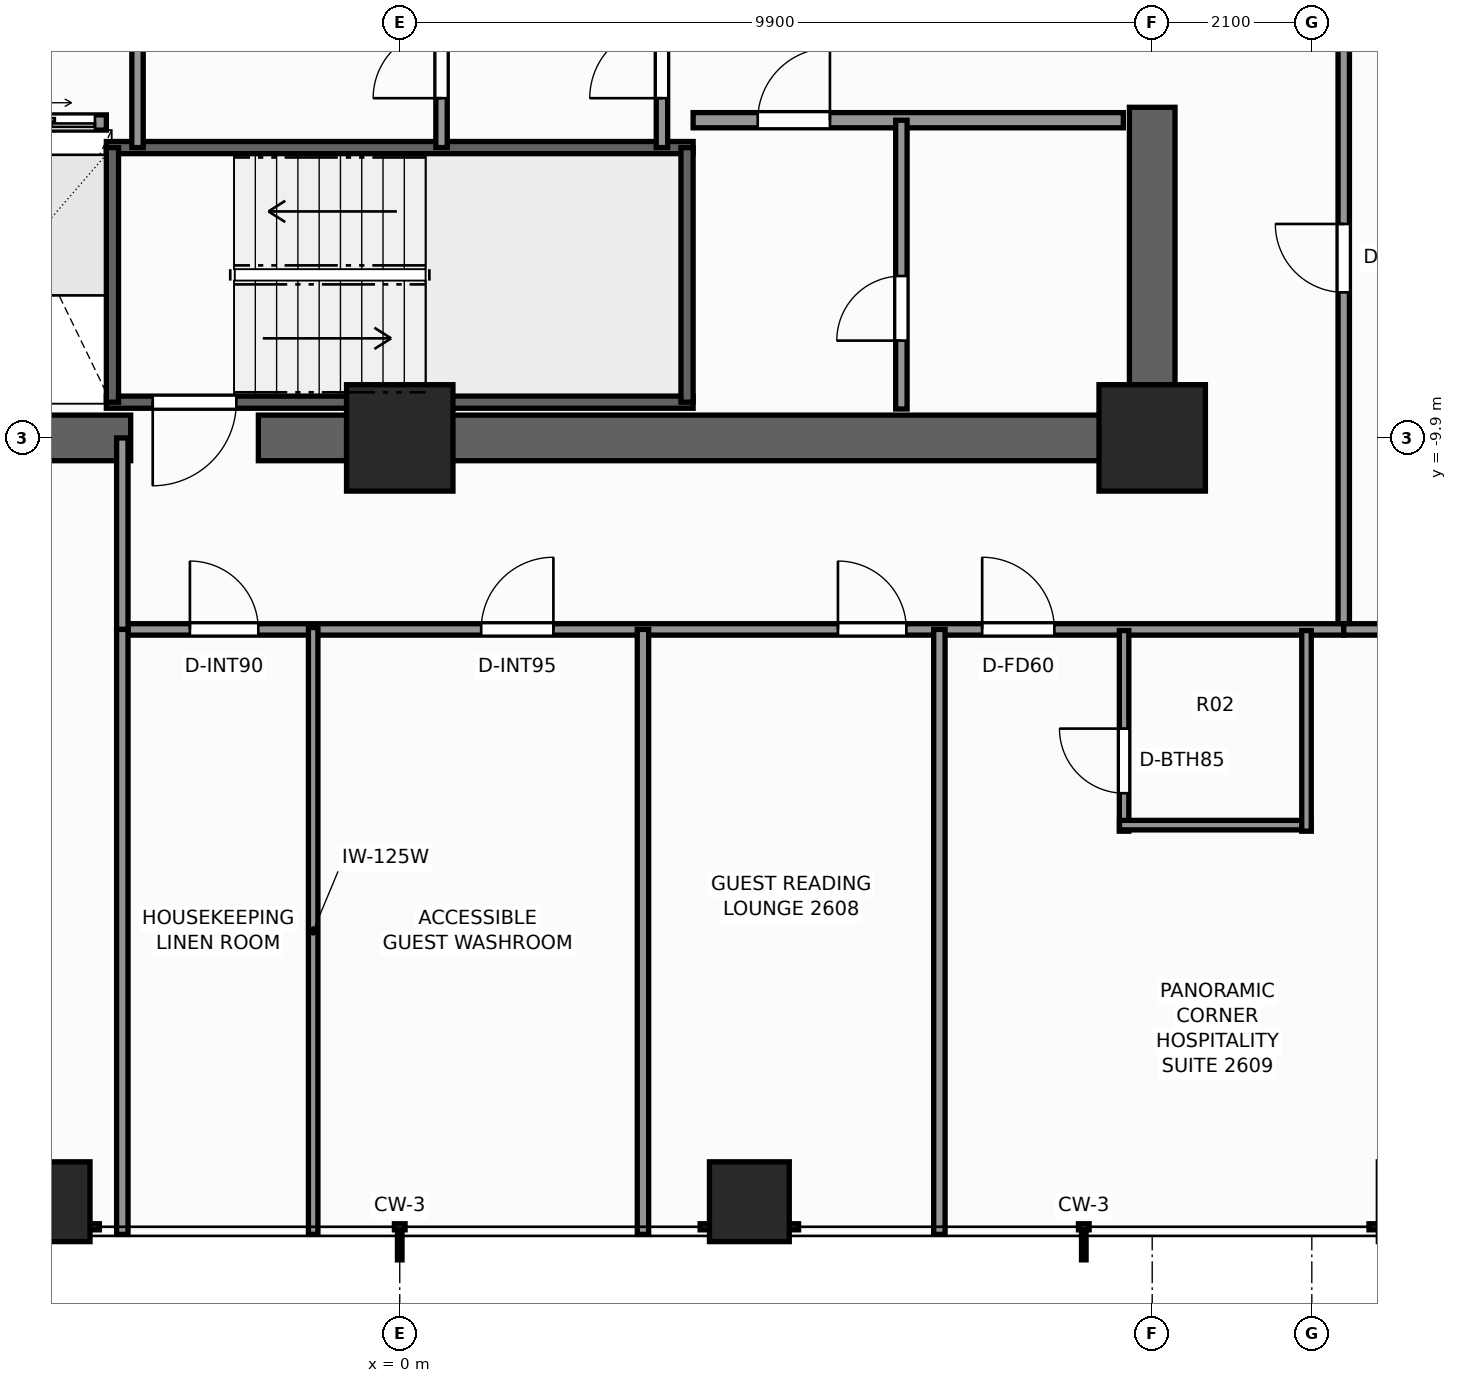
"""IFC4 building model, lengths in metres.
Left out: names, types, materials, properties, quantities, classifications, styles, units other than length and angle.
Written with IfcOpenShell. Run it as: python <this file> out.ifc"""

import sys

from ifc_helpers import new_model, si_unit, direction, frame, frame_2d, origin, origin_2d, place, context, subcontext, project, spatial, rectangle, extrude, element, fill, save


model = new_model("IFC4")
c1 = context("Model", 3, precision=1e-05, world=origin(), true_north=direction((0.0, 1.0)))
c2 = subcontext(c1, "Body", "Model", "MODEL_VIEW")
j1 = project(units=[si_unit("LENGTHUNIT", "METRE"), si_unit("PLANEANGLEUNIT", "RADIAN")], contexts=[c1])
p1 = place(None, origin())
s1 = spatial("IfcSite", under=j1, at=p1, CompositionType="ELEMENT")
p2 = place(p1, origin())
s2 = spatial("IfcBuilding", under=s1, at=p2, CompositionType="ELEMENT")
p3 = place(p2, frame((0.0, 0.0, 92.0)))
s3 = spatial("IfcBuildingStorey", under=s2, at=p3, CompositionType="ELEMENT", Elevation=92.0)
p4 = place(p3, frame((10.2, -9.9, 0.0), z_axis=(0.0, 0.0, 1.0), x_axis=(-1.0, 0.0, 0.0)))
e1 = element("IfcWall", 1, at=p4, inside=s3, PredefinedType="SHEAR", context=c2, shape_type="SweptSolid", body=[
    extrude(rectangle(XDim=12.06, YDim=0.6, at=frame_2d((6.03, 0.0))), origin(), (0.0, 0.0, 1.0), 3.3),
])
p5 = place(p3, frame((-3.54, -9.9, 0.0), z_axis=(0.0, 0.0, 1.0), x_axis=(-1.0, 0.0, 0.0)))
e2 = element("IfcWall", 2, at=p5, inside=s3, PredefinedType="SHEAR", context=c2, shape_type="SweptSolid", body=[
    extrude(rectangle(XDim=6.66, YDim=0.6, at=frame_2d((3.33, 0.0))), origin(), (0.0, 0.0, 1.0), 3.3),
])
p6 = place(p3, frame((9.9, -9.6, 0.0), z_axis=(0.0, 0.0, 1.0), x_axis=(0.0, 1.0, 0.0)))
e3 = element("IfcWall", 3, at=p6, inside=s3, PredefinedType="SHEAR", context=c2, shape_type="SweptSolid", body=[
    extrude(rectangle(XDim=4.05, YDim=0.6, at=frame_2d((2.025, 0.0))), origin(), (0.0, 0.0, 1.0), 3.3),
])
for number, where, z_axis, x_axis in (
    (4, (9.9, -9.9, 0.0), (0.0, 0.0, 1.0), (1.0, 0.0, 0.0)),
    (5, (0.0, -9.9, 0.0), (0.0, 0.0, 1.0), (1.0, 0.0, 0.0)),
):
    element("IfcColumn", number, at=place(p3, frame(where, z_axis=z_axis, x_axis=x_axis)), inside=s3, PredefinedType="COLUMN", context=c2, shape_type="SweptSolid", body=[
        extrude(rectangle(XDim=1.4, YDim=1.4, at=origin_2d()), origin(), (0.0, 0.0, 1.0), 3.3),
    ])
for number, where, z_axis, x_axis in (
    (6, (-4.6, -19.95, 0.0), (0.0, 0.0, 1.0), (1.0, 0.0, 0.0)),
    (7, (4.6, -19.95, 0.0), (0.0, 0.0, 1.0), (1.0, 0.0, 0.0)),
):
    element("IfcColumn", number, at=place(p3, frame(where, z_axis=z_axis, x_axis=x_axis)), inside=s3, PredefinedType="COLUMN", context=c2, shape_type="SweptSolid", body=[
        extrude(rectangle(XDim=1.05, YDim=1.05, at=origin_2d()), origin(), (0.0, 0.0, 1.0), 3.3),
    ])
p7 = place(p3, frame((3.86, -9.43, 0.0), z_axis=(0.0, 0.0, 1.0), x_axis=(-1.0, 0.0, 0.0)))
e8 = element("IfcWall", 8, at=p7, inside=s3, PredefinedType="SHEAR", context=c2, shape_type="SweptSolid", body=[
    extrude(rectangle(XDim=7.72, YDim=0.16, at=frame_2d((3.86, 0.0))), origin(), (0.0, 0.0, 1.0), 3.3),
])
p8 = place(p7, frame((6.01, 0.0, 0.0)))
e9 = element("IfcOpeningElement", 9, at=p8, cuts=e8, PredefinedType="OPENING", context=c2, shape_type="SweptSolid", body=[
    extrude(rectangle(XDim=1.1, YDim=2.2, at=frame_2d((0.55, 1.1))), frame((0.0, 0.09, 0.0), z_axis=(0.0, -1.0, 0.0), x_axis=(1.0, 0.0, 0.0)), (0.0, 0.0, 1.0), 0.18),
])
p9 = place(p3, frame((-3.86, -6.08, 0.0), z_axis=(0.0, 0.0, 1.0), x_axis=(1.0, 0.0, 0.0)))
e10 = element("IfcWall", 10, at=p9, inside=s3, PredefinedType="SHEAR", context=c2, shape_type="SweptSolid", body=[
    extrude(rectangle(XDim=7.72, YDim=0.16, at=frame_2d((3.86, 0.0))), origin(), (0.0, 0.0, 1.0), 3.3),
])
for number, where, z_axis, x_axis in (
    (11, (-3.78, -9.43, 0.0), (0.0, 0.0, 1.0), (0.0, 1.0, 0.0)),
    (12, (3.78, -9.43, 0.0), (0.0, 0.0, 1.0), (0.0, 1.0, 0.0)),
):
    element("IfcWall", number, at=place(p3, frame(where, z_axis=z_axis, x_axis=x_axis)), inside=s3, PredefinedType="SHEAR", context=c2, shape_type="SweptSolid", body=[
        extrude(rectangle(XDim=3.35, YDim=0.16, at=frame_2d((1.675, 0.0))), origin(), (0.0, 0.0, 1.0), 3.3),
    ])
p10 = place(p3, frame((-9.52, -5.75, 0.0), z_axis=(0.0, 0.0, 1.0), x_axis=(1.0, 0.0, 0.0)))
e13 = element("IfcWall", 13, at=p10, inside=s3, PredefinedType="SOLIDWALL", context=c2, shape_type="SweptSolid", body=[
    extrude(rectangle(XDim=5.66, YDim=0.2, at=frame_2d((2.83, 0.0))), origin(), (0.0, 0.0, 1.0), 3.08),
])
p11 = place(p10, frame((0.55, 0.0, 0.0)))
e14 = element("IfcOpeningElement", 14, at=p11, cuts=e13, PredefinedType="OPENING", context=c2, shape_type="SweptSolid", body=[
    extrude(rectangle(XDim=1.1, YDim=2.2, at=frame_2d((0.55, 1.1))), frame((0.0, 0.11, 0.0), z_axis=(0.0, -1.0, 0.0), x_axis=(1.0, 0.0, 0.0)), (0.0, 0.0, 1.0), 0.22),
])
p12 = place(p10, frame((2.48, 0.0, 0.0)))
e15 = element("IfcOpeningElement", 15, at=p12, cuts=e13, PredefinedType="OPENING", context=c2, shape_type="SweptSolid", body=[
    extrude(rectangle(XDim=1.1, YDim=2.2, at=frame_2d((0.55, 1.1))), frame((0.0, 0.11, 0.0), z_axis=(0.0, -1.0, 0.0), x_axis=(1.0, 0.0, 0.0)), (0.0, 0.0, 1.0), 0.22),
])
p13 = place(p10, frame((4.41, 0.0, 0.0)))
e16 = element("IfcOpeningElement", 16, at=p13, cuts=e13, PredefinedType="OPENING", context=c2, shape_type="SweptSolid", body=[
    extrude(rectangle(XDim=1.1, YDim=2.2, at=frame_2d((0.55, 1.1))), frame((0.0, 0.11, 0.0), z_axis=(0.0, -1.0, 0.0), x_axis=(1.0, 0.0, 0.0)), (0.0, 0.0, 1.0), 0.22),
])
p14 = place(p3, frame((3.86, -5.72, 0.0), z_axis=(0.0, 0.0, 1.0), x_axis=(1.0, 0.0, 0.0)))
e17 = element("IfcWall", 17, at=p14, inside=s3, PredefinedType="SOLIDWALL", context=c2, shape_type="SweptSolid", body=[
    extrude(rectangle(XDim=5.66, YDim=0.2, at=frame_2d((2.83, 0.0))), origin(), (0.0, 0.0, 1.0), 3.08),
])
p15 = place(p14, frame((0.85, 0.0, 0.0)))
e18 = element("IfcOpeningElement", 18, at=p15, cuts=e17, PredefinedType="OPENING", context=c2, shape_type="SweptSolid", body=[
    extrude(rectangle(XDim=0.95, YDim=2.06, at=frame_2d((0.475, 1.03))), frame((0.0, 0.11, 0.0), z_axis=(0.0, -1.0, 0.0), x_axis=(1.0, 0.0, 0.0)), (0.0, 0.0, 1.0), 0.22),
])
p16 = place(p3, frame((6.6, -9.52, 0.0), z_axis=(0.0, 0.0, 1.0), x_axis=(0.0, 1.0, 0.0)))
e19 = element("IfcWall", 19, at=p16, inside=s3, PredefinedType="PARTITIONING", context=c2, shape_type="SweptSolid", body=[
    extrude(rectangle(XDim=3.8, YDim=0.15, at=frame_2d((1.9, 0.0))), origin(), (0.0, 0.0, 1.0), 3.08),
])
p17 = place(p16, frame((0.9, 0.0, 0.0)))
e20 = element("IfcOpeningElement", 20, at=p17, cuts=e19, PredefinedType="OPENING", context=c2, shape_type="SweptSolid", body=[
    extrude(rectangle(XDim=0.85, YDim=2.03, at=frame_2d((0.425, 1.015))), frame((0.0, 0.085, 0.0), z_axis=(0.0, -1.0, 0.0), x_axis=(1.0, 0.0, 0.0)), (0.0, 0.0, 1.0), 0.17),
])
p18 = place(p3, frame((3.45, -6.08, 0.0), z_axis=(0.0, 0.0, 1.0), x_axis=(0.0, 1.0, 0.0)))
e21 = element("IfcWall", 21, at=p18, inside=s3, PredefinedType="PARTITIONING", context=c2, shape_type="SweptSolid", body=[
    extrude(rectangle(XDim=2.36, YDim=0.15, at=frame_2d((1.18, 0.0))), origin(), (0.0, 0.0, 1.0), 3.08),
])
p19 = place(p18, frame((0.65, 0.0, 0.0)))
e22 = element("IfcOpeningElement", 22, at=p19, cuts=e21, PredefinedType="OPENING", context=c2, shape_type="SweptSolid", body=[
    extrude(rectangle(XDim=0.95, YDim=2.06, at=frame_2d((0.475, 1.03))), frame((0.0, 0.085, 0.0), z_axis=(0.0, -1.0, 0.0), x_axis=(1.0, 0.0, 0.0)), (0.0, 0.0, 1.0), 0.17),
])
p20 = place(p3, frame((-3.45, -6.08, 0.0), z_axis=(0.0, 0.0, 1.0), x_axis=(0.0, 1.0, 0.0)))
e23 = element("IfcWall", 23, at=p20, inside=s3, PredefinedType="PARTITIONING", context=c2, shape_type="SweptSolid", body=[
    extrude(rectangle(XDim=2.36, YDim=0.15, at=frame_2d((1.18, 0.0))), origin(), (0.0, 0.0, 1.0), 3.08),
])
p21 = place(p3, frame((0.55, -6.08, 0.0), z_axis=(0.0, 0.0, 1.0), x_axis=(0.0, 1.0, 0.0)))
e24 = element("IfcWall", 24, at=p21, inside=s3, PredefinedType="PARTITIONING", context=c2, shape_type="SweptSolid", body=[
    extrude(rectangle(XDim=2.36, YDim=0.15, at=frame_2d((1.18, 0.0))), origin(), (0.0, 0.0, 1.0), 3.08),
])
p22 = place(p21, frame((0.65, 0.0, 0.0)))
e25 = element("IfcOpeningElement", 25, at=p22, cuts=e24, PredefinedType="OPENING", context=c2, shape_type="SweptSolid", body=[
    extrude(rectangle(XDim=0.9, YDim=2.06, at=frame_2d((0.45, 1.03))), frame((0.0, 0.085, 0.0), z_axis=(0.0, -1.0, 0.0), x_axis=(1.0, 0.0, 0.0)), (0.0, 0.0, 1.0), 0.17),
])
p23 = place(p3, frame((12.42, -12.42, 0.0), z_axis=(0.0, 0.0, 1.0), x_axis=(0.0, 1.0, 0.0)))
e26 = element("IfcWall", 26, at=p23, inside=s3, PredefinedType="PARTITIONING", context=c2, shape_type="SweptSolid", body=[
    extrude(rectangle(XDim=24.84, YDim=0.15, at=frame_2d((12.42, 0.0))), origin(), (0.0, 0.0, 1.0), 2.292),
])
p24 = place(p23, frame((4.435, 0.0, 0.0)))
e27 = element("IfcOpeningElement", 27, at=p24, cuts=e26, PredefinedType="OPENING", context=c2, shape_type="SweptSolid", body=[
    extrude(rectangle(XDim=0.9, YDim=2.06, at=frame_2d((0.45, 1.03))), frame((0.0, 0.085, 0.0), z_axis=(0.0, -1.0, 0.0), x_axis=(1.0, 0.0, 0.0)), (0.0, 0.0, 1.0), 0.17),
])
p25 = place(p23, frame((19.505, 0.0, 0.0)))
e28 = element("IfcOpeningElement", 28, at=p25, cuts=e26, PredefinedType="OPENING", context=c2, shape_type="SweptSolid", body=[
    extrude(rectangle(XDim=0.9, YDim=2.06, at=frame_2d((0.45, 1.03))), frame((0.0, 0.085, 0.0), z_axis=(0.0, -1.0, 0.0), x_axis=(1.0, 0.0, 0.0)), (0.0, 0.0, 1.0), 0.17),
])
p26 = place(p3, frame((-3.65, -12.42, 0.0), z_axis=(0.0, 0.0, 1.0), x_axis=(1.0, 0.0, 0.0)))
e29 = element("IfcWall", 29, at=p26, inside=s3, PredefinedType="PARTITIONING", context=c2, shape_type="SweptSolid", body=[
    extrude(rectangle(XDim=16.07, YDim=0.15, at=frame_2d((8.035, 0.0))), origin(), (0.0, 0.0, 1.0), 2.292),
])
p27 = place(p26, frame((0.889, 0.0, 0.0)))
e30 = element("IfcOpeningElement", 30, at=p27, cuts=e29, PredefinedType="OPENING", context=c2, shape_type="SweptSolid", body=[
    extrude(rectangle(XDim=0.9, YDim=2.06, at=frame_2d((0.45, 1.03))), frame((0.0, 0.085, 0.0), z_axis=(0.0, -1.0, 0.0), x_axis=(1.0, 0.0, 0.0)), (0.0, 0.0, 1.0), 0.17),
])
p28 = place(p26, frame((4.722, 0.0, 0.0)))
e31 = element("IfcOpeningElement", 31, at=p28, cuts=e29, PredefinedType="OPENING", context=c2, shape_type="SweptSolid", body=[
    extrude(rectangle(XDim=0.95, YDim=2.06, at=frame_2d((0.475, 1.03))), frame((0.0, 0.085, 0.0), z_axis=(0.0, -1.0, 0.0), x_axis=(1.0, 0.0, 0.0)), (0.0, 0.0, 1.0), 0.17),
])
p29 = place(p26, frame((9.415, 0.0, 0.0)))
e32 = element("IfcOpeningElement", 32, at=p29, cuts=e29, PredefinedType="OPENING", context=c2, shape_type="SweptSolid", body=[
    extrude(rectangle(XDim=0.9, YDim=2.06, at=frame_2d((0.45, 1.03))), frame((0.0, 0.085, 0.0), z_axis=(0.0, -1.0, 0.0), x_axis=(1.0, 0.0, 0.0)), (0.0, 0.0, 1.0), 0.17),
])
p30 = place(p26, frame((11.313, 0.0, 0.0)))
e33 = element("IfcOpeningElement", 33, at=p30, cuts=e29, PredefinedType="OPENING", context=c2, shape_type="SweptSolid", body=[
    extrude(rectangle(XDim=0.95, YDim=2.06, at=frame_2d((0.475, 1.03))), frame((0.0, 0.085, 0.0), z_axis=(0.0, -1.0, 0.0), x_axis=(1.0, 0.0, 0.0)), (0.0, 0.0, 1.0), 0.17),
])
p31 = place(p3, frame((-3.65, -12.42, 0.0), z_axis=(0.0, 0.0, 1.0), x_axis=(0.0, 1.0, 0.0)))
e34 = element("IfcWall", 34, at=p31, inside=s3, PredefinedType="PARTITIONING", context=c2, shape_type="SweptSolid", body=[
    extrude(rectangle(XDim=2.52, YDim=0.15, at=frame_2d((1.26, 0.0))), origin(), (0.0, 0.0, 1.0), 3.08),
])
p32 = place(p3, frame((12.42, -12.42, 0.0), z_axis=(0.0, 0.0, 1.0), x_axis=(1.0, 0.0, 0.0)))
e35 = element("IfcWall", 35, at=p32, inside=s3, PredefinedType="PARTITIONING", context=c2, shape_type="SweptSolid", body=[
    extrude(rectangle(XDim=7.96, YDim=0.15, at=frame_2d((3.98, 0.0))), origin(), (0.0, 0.0, 1.0), 2.292),
])
for number, where, z_axis, x_axis in (
    (36, (-3.65, -20.38, 0.0), (0.0, 0.0, 1.0), (0.0, 1.0, 0.0)),
    (37, (3.2, -20.38, 0.0), (0.0, 0.0, 1.0), (0.0, 1.0, 0.0)),
):
    element("IfcWall", number, at=place(p3, frame(where, z_axis=z_axis, x_axis=x_axis)), inside=s3, PredefinedType="PARTITIONING", context=c2, shape_type="SweptSolid", body=[
        extrude(rectangle(XDim=7.96, YDim=0.15, at=frame_2d((3.98, 0.0))), origin(), (0.0, 0.0, 1.0), 2.449),
    ])
p33 = place(p3, frame((-1.139, -20.38, 0.0), z_axis=(0.0, 0.0, 1.0), x_axis=(0.0, 1.0, 0.0)))
e38 = element("IfcWall", 38, at=p33, inside=s3, PredefinedType="PARTITIONING", context=c2, shape_type="SweptSolid", body=[
    extrude(rectangle(XDim=7.985, YDim=0.125, at=frame_2d((3.992, 0.0))), origin(), (0.0, 0.0, 1.0), 2.449),
])
p34 = place(p3, frame((7.1, -20.38, 0.0), z_axis=(0.0, 0.0, 1.0), x_axis=(0.0, 1.0, 0.0)))
e39 = element("IfcWall", 39, at=p34, inside=s3, PredefinedType="PARTITIONING", context=c2, shape_type="SweptSolid", body=[
    extrude(rectangle(XDim=7.96, YDim=0.15, at=frame_2d((3.98, 0.0))), origin(), (0.0, 0.0, 1.0), 2.449),
])
p35 = place(p3, frame((9.53, -15.075, 0.0), z_axis=(0.0, 0.0, 1.0), x_axis=(0.0, 1.0, 0.0)))
e40 = element("IfcWall", 40, at=p35, inside=s3, PredefinedType="PARTITIONING", context=c2, shape_type="SweptSolid", body=[
    extrude(rectangle(XDim=2.64, YDim=0.125, at=frame_2d((1.32, 0.0))), origin(), (0.0, 0.0, 1.0), 3.08),
])
p36 = place(p35, frame((0.5, 0.0, 0.0)))
e41 = element("IfcOpeningElement", 41, at=p36, cuts=e40, PredefinedType="OPENING", context=c2, shape_type="SweptSolid", body=[
    extrude(rectangle(XDim=0.85, YDim=2.03, at=frame_2d((0.425, 1.015))), frame((0.0, 0.073, 0.0), z_axis=(0.0, -1.0, 0.0), x_axis=(1.0, 0.0, 0.0)), (0.0, 0.0, 1.0), 0.145),
])
p37 = place(p3, frame((9.47, -14.995, 0.0), z_axis=(0.0, 0.0, 1.0), x_axis=(1.0, 0.0, 0.0)))
e42 = element("IfcWall", 42, at=p37, inside=s3, PredefinedType="PARTITIONING", context=c2, shape_type="SweptSolid", body=[
    extrude(rectangle(XDim=2.52, YDim=0.125, at=frame_2d((1.26, 0.0))), origin(), (0.0, 0.0, 1.0), 2.292),
])
p38 = place(p3, frame((11.93, -15.075, 0.0), z_axis=(0.0, 0.0, 1.0), x_axis=(0.0, 1.0, 0.0)))
e43 = element("IfcWall", 43, at=p38, inside=s3, PredefinedType="PARTITIONING", context=c2, shape_type="SweptSolid", body=[
    extrude(rectangle(XDim=2.64, YDim=0.125, at=frame_2d((1.32, 0.0))), origin(), (0.0, 0.0, 1.0), 2.292),
])
p39 = place(p8, origin())
e44 = element("IfcDoor", 44, at=p39, inside=s3, OperationType="SINGLE_SWING_RIGHT", PredefinedType="DOOR", context=c2, shape_type="SweptSolid", body=[
    extrude(rectangle(XDim=1.1, YDim=2.2, at=frame_2d((0.55, 1.1))), frame((0.0, 0.025, 0.0), z_axis=(0.0, -1.0, 0.0), x_axis=(1.0, 0.0, 0.0)), (0.0, 0.0, 1.0), 0.05),
])
fill(e9, e44)
p40 = place(p13, origin())
e45 = element("IfcDoor", 45, at=p40, inside=s3, OperationType="DOUBLE_DOOR_SLIDING", PredefinedType="DOOR", context=c2, shape_type="SweptSolid", body=[
    extrude(rectangle(XDim=1.1, YDim=2.2, at=frame_2d((0.55, 1.1))), frame((0.0, 0.025, 0.0), z_axis=(0.0, -1.0, 0.0), x_axis=(1.0, 0.0, 0.0)), (0.0, 0.0, 1.0), 0.05),
])
fill(e16, e45)
p41 = place(p15, origin())
e46 = element("IfcDoor", 46, at=p41, inside=s3, OperationType="SINGLE_SWING_RIGHT", PredefinedType="DOOR", context=c2, shape_type="SweptSolid", body=[
    extrude(rectangle(XDim=0.95, YDim=2.06, at=frame_2d((0.475, 1.03))), frame((0.0, 0.025, 0.0), z_axis=(0.0, -1.0, 0.0), x_axis=(1.0, 0.0, 0.0)), (0.0, 0.0, 1.0), 0.05),
])
fill(e18, e46)
p42 = place(p17, origin())
e47 = element("IfcDoor", 47, at=p42, inside=s3, OperationType="SINGLE_SWING_LEFT", PredefinedType="DOOR", context=c2, shape_type="SweptSolid", body=[
    extrude(rectangle(XDim=0.85, YDim=2.03, at=frame_2d((0.425, 1.015))), frame((0.0, 0.025, 0.0), z_axis=(0.0, -1.0, 0.0), x_axis=(1.0, 0.0, 0.0)), (0.0, 0.0, 1.0), 0.05),
])
fill(e20, e47)
p43 = place(p19, origin())
e48 = element("IfcDoor", 48, at=p43, inside=s3, OperationType="SINGLE_SWING_LEFT", PredefinedType="DOOR", context=c2, shape_type="SweptSolid", body=[
    extrude(rectangle(XDim=0.95, YDim=2.06, at=frame_2d((0.475, 1.03))), frame((0.0, 0.025, 0.0), z_axis=(0.0, -1.0, 0.0), x_axis=(1.0, 0.0, 0.0)), (0.0, 0.0, 1.0), 0.05),
])
fill(e22, e48)
p44 = place(p22, origin())
e49 = element("IfcDoor", 49, at=p44, inside=s3, OperationType="SINGLE_SWING_LEFT", PredefinedType="DOOR", context=c2, shape_type="SweptSolid", body=[
    extrude(rectangle(XDim=0.9, YDim=2.06, at=frame_2d((0.45, 1.03))), frame((0.0, 0.025, 0.0), z_axis=(0.0, -1.0, 0.0), x_axis=(1.0, 0.0, 0.0)), (0.0, 0.0, 1.0), 0.05),
])
fill(e25, e49)
p45 = place(p24, origin())
e50 = element("IfcDoor", 50, at=p45, inside=s3, OperationType="SINGLE_SWING_RIGHT", PredefinedType="DOOR", context=c2, shape_type="SweptSolid", body=[
    extrude(rectangle(XDim=0.9, YDim=2.06, at=frame_2d((0.45, 1.03))), frame((0.0, 0.025, 0.0), z_axis=(0.0, -1.0, 0.0), x_axis=(1.0, 0.0, 0.0)), (0.0, 0.0, 1.0), 0.05),
])
fill(e27, e50)
p46 = place(p27, origin())
e51 = element("IfcDoor", 51, at=p46, inside=s3, OperationType="SINGLE_SWING_LEFT", PredefinedType="DOOR", context=c2, shape_type="SweptSolid", body=[
    extrude(rectangle(XDim=0.9, YDim=2.06, at=frame_2d((0.45, 1.03))), frame((0.0, 0.025, 0.0), z_axis=(0.0, -1.0, 0.0), x_axis=(1.0, 0.0, 0.0)), (0.0, 0.0, 1.0), 0.05),
])
fill(e30, e51)
p47 = place(p28, origin())
e52 = element("IfcDoor", 52, at=p47, inside=s3, OperationType="SINGLE_SWING_RIGHT", PredefinedType="DOOR", context=c2, shape_type="SweptSolid", body=[
    extrude(rectangle(XDim=0.95, YDim=2.06, at=frame_2d((0.475, 1.03))), frame((0.0, 0.025, 0.0), z_axis=(0.0, -1.0, 0.0), x_axis=(1.0, 0.0, 0.0)), (0.0, 0.0, 1.0), 0.05),
])
fill(e31, e52)
p48 = place(p29, origin())
e53 = element("IfcDoor", 53, at=p48, inside=s3, OperationType="SINGLE_SWING_LEFT", PredefinedType="DOOR", context=c2, shape_type="SweptSolid", body=[
    extrude(rectangle(XDim=0.9, YDim=2.06, at=frame_2d((0.45, 1.03))), frame((0.0, 0.025, 0.0), z_axis=(0.0, -1.0, 0.0), x_axis=(1.0, 0.0, 0.0)), (0.0, 0.0, 1.0), 0.05),
])
fill(e32, e53)
p49 = place(p36, origin())
e54 = element("IfcDoor", 54, at=p49, inside=s3, OperationType="SINGLE_SWING_RIGHT", PredefinedType="DOOR", context=c2, shape_type="SweptSolid", body=[
    extrude(rectangle(XDim=0.85, YDim=2.03, at=frame_2d((0.425, 1.015))), frame((0.0, 0.025, 0.0), z_axis=(0.0, -1.0, 0.0), x_axis=(1.0, 0.0, 0.0)), (0.0, 0.0, 1.0), 0.05),
])
fill(e41, e54)
p50 = place(p30, origin())
e55 = element("IfcDoor", 55, at=p50, inside=s3, OperationType="SINGLE_SWING_LEFT", PredefinedType="DOOR", context=c2, shape_type="SweptSolid", body=[
    extrude(rectangle(XDim=0.95, YDim=2.06, at=frame_2d((0.475, 1.03))), frame((0.0, 0.025, 0.0), z_axis=(0.0, -1.0, 0.0), x_axis=(1.0, 0.0, 0.0)), (0.0, 0.0, 1.0), 0.05),
])
fill(e33, e55)
save(model, sys.argv[1])
